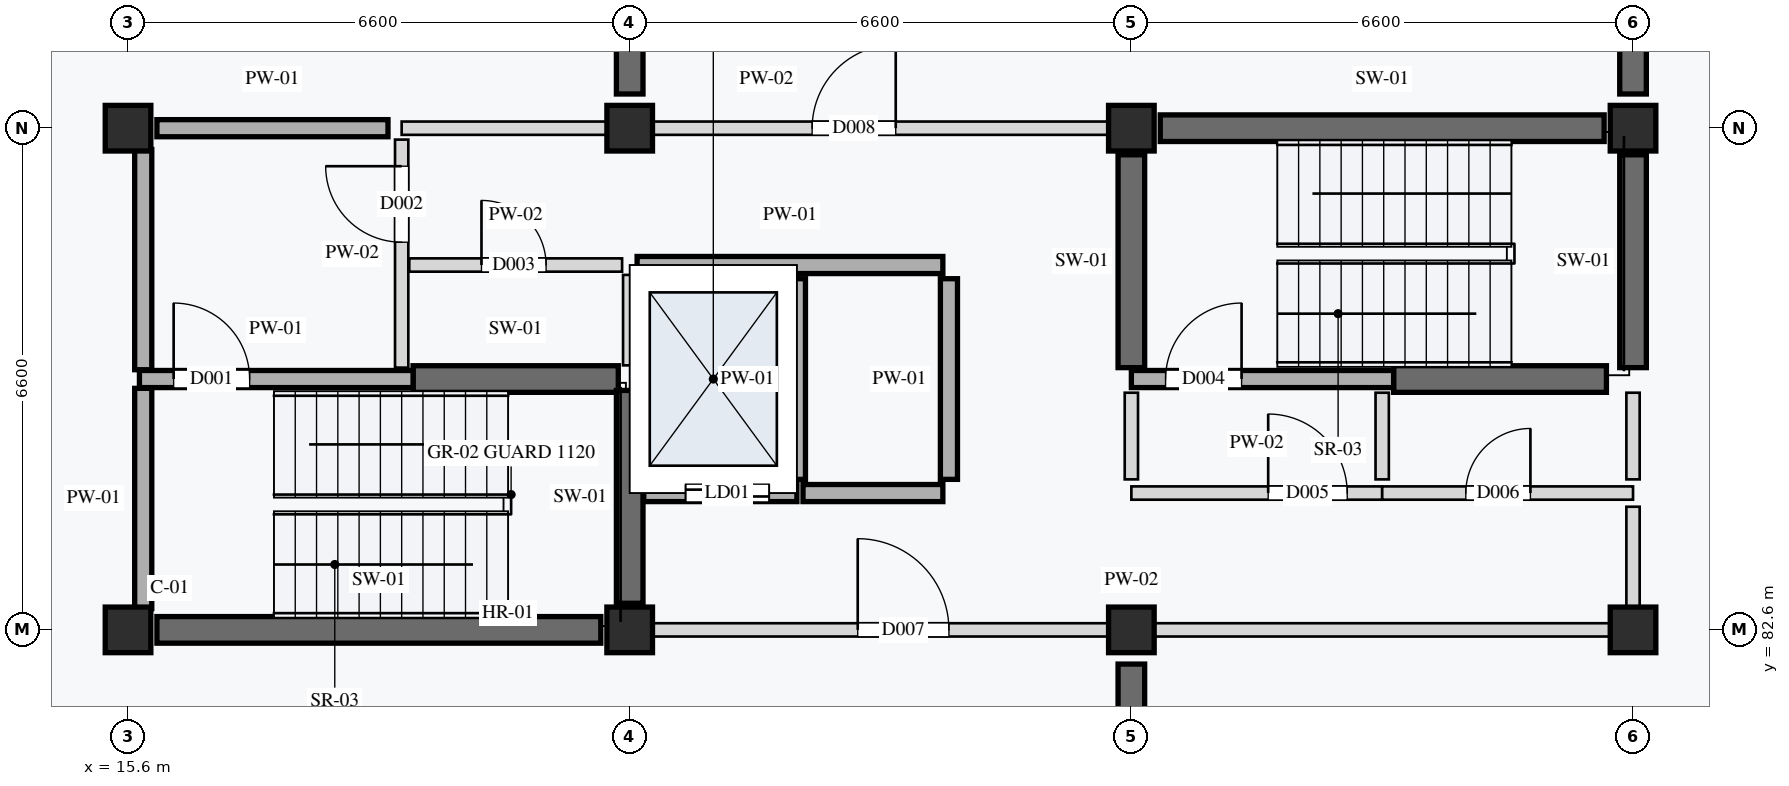
"""IFC4 building model, lengths in metres.
Left out: names, types, materials, properties, quantities, classifications, styles, units other than length and angle.
Written with IfcOpenShell. Run it as: python <this file> out.ifc"""

import sys

from ifc_helpers import new_model, si_unit, direction, frame, frame_2d, origin, origin_2d, place, context, subcontext, project, spatial, rectangle, extrude, element, fill, save


model = new_model("IFC4")
c1 = context("Model", 3, precision=1e-05, world=origin(), true_north=direction((0.0, 1.0)))
c2 = subcontext(c1, "Body", "Model", "MODEL_VIEW")
j1 = project(units=[si_unit("LENGTHUNIT", "METRE"), si_unit("PLANEANGLEUNIT", "RADIAN")], contexts=[c1])
p1 = place(None, origin())
s1 = spatial("IfcSite", under=j1, at=p1, CompositionType="ELEMENT")
p2 = place(p1, origin())
s2 = spatial("IfcBuilding", under=s1, at=p2, CompositionType="ELEMENT")
p3 = place(p2, frame((0.0, 0.0, -3.8)))
s3 = spatial("IfcBuildingStorey", under=s2, at=p3, CompositionType="ELEMENT", Elevation=-3.8)
for number, where, z_axis, x_axis in (
    (1, (15.6, 82.6, 0.0), (0.0, 0.0, 1.0), (1.0, 0.0, 0.0)),
    (2, (15.6, 89.2, 0.0), (0.0, 0.0, 1.0), (1.0, 0.0, 0.0)),
    (3, (22.2, 82.6, 0.0), (0.0, 0.0, 1.0), (1.0, 0.0, 0.0)),
    (4, (22.2, 89.2, 0.0), (0.0, 0.0, 1.0), (1.0, 0.0, 0.0)),
    (5, (28.8, 82.6, 0.0), (0.0, 0.0, 1.0), (1.0, 0.0, 0.0)),
    (6, (28.8, 89.2, 0.0), (0.0, 0.0, 1.0), (1.0, 0.0, 0.0)),
    (7, (35.4, 82.6, 0.0), (0.0, 0.0, 1.0), (1.0, 0.0, 0.0)),
    (8, (35.4, 89.2, 0.0), (0.0, 0.0, 1.0), (1.0, 0.0, 0.0)),
):
    element("IfcColumn", number, at=place(p3, frame(where, z_axis=z_axis, x_axis=x_axis)), inside=s3, PredefinedType="COLUMN", context=c2, shape_type="SweptSolid", body=[
        extrude(rectangle(XDim=0.6, YDim=0.6, at=origin_2d()), origin(), (0.0, 0.0, 1.0), 3.8),
    ])
p4 = place(p3, frame((15.98, 82.6, 0.0), z_axis=(0.0, 0.0, 1.0), x_axis=(1.0, 0.0, 0.0)))
e9 = element("IfcWall", 9, at=p4, inside=s3, PredefinedType="SHEAR", context=c2, shape_type="SweptSolid", body=[
    extrude(rectangle(XDim=5.84, YDim=0.35, at=frame_2d((2.92, 0.0))), origin(), (0.0, 0.0, 1.0), 3.52),
])
p5 = place(p3, frame((19.35, 85.9, 0.0), z_axis=(0.0, 0.0, 1.0), x_axis=(1.0, 0.0, 0.0)))
e10 = element("IfcWall", 10, at=p5, inside=s3, PredefinedType="SHEAR", context=c2, shape_type="SweptSolid", body=[
    extrude(rectangle(XDim=2.7, YDim=0.35, at=frame_2d((1.35, 0.0))), origin(), (0.0, 0.0, 1.0), 3.52),
])
p6 = place(p3, frame((22.2, 82.95, 0.0), z_axis=(0.0, 0.0, 1.0), x_axis=(0.0, 1.0, 0.0)))
e11 = element("IfcWall", 11, at=p6, inside=s3, PredefinedType="SHEAR", context=c2, shape_type="SweptSolid", body=[
    extrude(rectangle(XDim=2.8, YDim=0.35, at=frame_2d((1.4, 0.0))), origin(), (0.0, 0.0, 1.0), 3.52),
])
p7 = place(p3, frame((29.18, 89.2, 0.0), z_axis=(0.0, 0.0, 1.0), x_axis=(1.0, 0.0, 0.0)))
e12 = element("IfcWall", 12, at=p7, inside=s3, PredefinedType="SHEAR", context=c2, shape_type="SweptSolid", body=[
    extrude(rectangle(XDim=5.84, YDim=0.35, at=frame_2d((2.92, 0.0))), origin(), (0.0, 0.0, 1.0), 3.52),
])
for number, where, z_axis, x_axis in (
    (13, (32.25, 85.9, 0.0), (0.0, 0.0, 1.0), (1.0, 0.0, 0.0)),
    (14, (28.8, 86.05, 0.0), (0.0, 0.0, 1.0), (0.0, 1.0, 0.0)),
    (15, (35.4, 86.05, 0.0), (0.0, 0.0, 1.0), (0.0, 1.0, 0.0)),
):
    element("IfcWall", number, at=place(p3, frame(where, z_axis=z_axis, x_axis=x_axis)), inside=s3, PredefinedType="SHEAR", context=c2, shape_type="SweptSolid", body=[
        extrude(rectangle(XDim=2.8, YDim=0.35, at=frame_2d((1.4, 0.0))), origin(), (0.0, 0.0, 1.0), 3.52),
    ])
p8 = place(p3, frame((28.8, 76.45, 0.0), z_axis=(0.0, 0.0, 1.0), x_axis=(0.0, 1.0, 0.0)))
e16 = element("IfcWall", 16, at=p8, inside=s3, PredefinedType="SHEAR", context=c2, shape_type="SweptSolid", body=[
    extrude(rectangle(XDim=5.7, YDim=0.35, at=frame_2d((2.85, 0.0))), origin(), (0.0, 0.0, 1.0), 3.52),
])
for number, where, z_axis, x_axis in (
    (17, (22.2, 89.65, 0.0), (0.0, 0.0, 1.0), (0.0, 1.0, 0.0)),
    (18, (35.4, 89.65, 0.0), (0.0, 0.0, 1.0), (0.0, 1.0, 0.0)),
):
    element("IfcWall", number, at=place(p3, frame(where, z_axis=z_axis, x_axis=x_axis)), inside=s3, PredefinedType="SHEAR", context=c2, shape_type="SweptSolid", body=[
        extrude(rectangle(XDim=5.7, YDim=0.35, at=frame_2d((2.85, 0.0))), origin(), (0.0, 0.0, 1.0), 3.52),
    ])
p9 = place(p3, frame((15.75, 85.9, 0.0), z_axis=(0.0, 0.0, 1.0), x_axis=(1.0, 0.0, 0.0)))
e19 = element("IfcWall", 19, at=p9, inside=s3, PredefinedType="STANDARD", context=c2, shape_type="SweptSolid", body=[
    extrude(rectangle(XDim=3.6, YDim=0.225, at=frame_2d((1.8, 0.0))), origin(), (0.0, 0.0, 1.0), 3.52),
])
p10 = place(p9, frame((0.45, 0.0, 0.0)))
e20 = element("IfcOpeningElement", 20, at=p10, cuts=e19, PredefinedType="OPENING", context=c2, shape_type="SweptSolid", body=[
    extrude(rectangle(XDim=1.0, YDim=2.1, at=frame_2d((0.5, 1.05))), frame((0.0, 0.123, 0.0), z_axis=(0.0, -1.0, 0.0), x_axis=(1.0, 0.0, 0.0)), (0.0, 0.0, 1.0), 0.245),
])
p11 = place(p3, frame((19.2, 86.05, 0.0), z_axis=(0.0, 0.0, 1.0), x_axis=(0.0, 1.0, 0.0)))
e21 = element("IfcWall", 21, at=p11, inside=s3, PredefinedType="PARTITIONING", context=c2, shape_type="SweptSolid", body=[
    extrude(rectangle(XDim=3.0, YDim=0.175, at=frame_2d((1.5, 0.0))), origin(), (0.0, 0.0, 1.0), 3.52),
])
p12 = place(p11, frame((1.65, 0.0, 0.0)))
e22 = element("IfcOpeningElement", 22, at=p12, cuts=e21, PredefinedType="OPENING", context=c2, shape_type="SweptSolid", body=[
    extrude(rectangle(XDim=1.0, YDim=2.16, at=frame_2d((0.5, 1.08))), frame((0.0, 0.097, 0.0), z_axis=(0.0, -1.0, 0.0), x_axis=(1.0, 0.0, 0.0)), (0.0, 0.0, 1.0), 0.195),
])
p13 = place(p3, frame((19.3, 87.4, 0.0), z_axis=(0.0, 0.0, 1.0), x_axis=(1.0, 0.0, 0.0)))
e23 = element("IfcWall", 23, at=p13, inside=s3, PredefinedType="PARTITIONING", context=c2, shape_type="SweptSolid", body=[
    extrude(rectangle(XDim=2.8, YDim=0.175, at=frame_2d((1.4, 0.0))), origin(), (0.0, 0.0, 1.0), 3.52),
])
p14 = place(p13, frame((0.95, 0.0, 0.0)))
e24 = element("IfcOpeningElement", 24, at=p14, cuts=e23, PredefinedType="OPENING", context=c2, shape_type="SweptSolid", body=[
    extrude(rectangle(XDim=0.85, YDim=2.0, at=frame_2d((0.425, 1.0))), frame((0.0, 0.097, 0.0), z_axis=(0.0, -1.0, 0.0), x_axis=(1.0, 0.0, 0.0)), (0.0, 0.0, 1.0), 0.195),
])
p15 = place(p3, frame((22.2, 86.08, 0.0), z_axis=(0.0, 0.0, 1.0), x_axis=(0.0, 1.0, 0.0)))
e25 = element("IfcWall", 25, at=p15, inside=s3, PredefinedType="PARTITIONING", context=c2, shape_type="SweptSolid", body=[
    extrude(rectangle(XDim=1.19, YDim=0.175, at=frame_2d((0.595, 0.0))), origin(), (0.0, 0.0, 1.0), 3.52),
])
p16 = place(p3, frame((22.385, 84.4, 0.0), z_axis=(0.0, 0.0, 1.0), x_axis=(1.0, 0.0, 0.0)))
e26 = element("IfcWall", 26, at=p16, inside=s3, PredefinedType="STANDARD", context=c2, shape_type="SweptSolid", body=[
    extrude(rectangle(XDim=2.015, YDim=0.225, at=frame_2d((1.007, 0.0))), origin(), (0.0, 0.0, 1.0), 3.52),
])
p17 = place(p16, frame((0.55, 0.0, 0.0)))
e27 = element("IfcOpeningElement", 27, at=p17, cuts=e26, PredefinedType="OPENING", context=c2, shape_type="SweptSolid", body=[
    extrude(rectangle(XDim=1.1, YDim=2.1, at=frame_2d((0.55, 1.05))), frame((0.0, 0.123, 0.0), z_axis=(0.0, -1.0, 0.0), x_axis=(1.0, 0.0, 0.0)), (0.0, 0.0, 1.0), 0.245),
])
p18 = place(p3, frame((24.48, 84.4, 0.0), z_axis=(0.0, 0.0, 1.0), x_axis=(1.0, 0.0, 0.0)))
e28 = element("IfcWall", 28, at=p18, inside=s3, PredefinedType="STANDARD", context=c2, shape_type="SweptSolid", body=[
    extrude(rectangle(XDim=1.84, YDim=0.225, at=frame_2d((0.92, 0.0))), origin(), (0.0, 0.0, 1.0), 3.52),
])
p19 = place(p3, frame((22.298, 87.4, 0.0), z_axis=(0.0, 0.0, 1.0), x_axis=(1.0, 0.0, 0.0)))
e29 = element("IfcWall", 29, at=p19, inside=s3, PredefinedType="STANDARD", context=c2, shape_type="SweptSolid", body=[
    extrude(rectangle(XDim=4.022, YDim=0.225, at=frame_2d((2.011, 0.0))), origin(), (0.0, 0.0, 1.0), 3.52),
])
for number, where, z_axis, x_axis in (
    (30, (24.4, 84.58, 0.0), (0.0, 0.0, 1.0), (0.0, 1.0, 0.0)),
    (31, (26.4, 84.58, 0.0), (0.0, 0.0, 1.0), (0.0, 1.0, 0.0)),
):
    element("IfcWall", number, at=place(p3, frame(where, z_axis=z_axis, x_axis=x_axis)), inside=s3, PredefinedType="STANDARD", context=c2, shape_type="SweptSolid", body=[
        extrude(rectangle(XDim=2.64, YDim=0.225, at=frame_2d((1.32, 0.0))), origin(), (0.0, 0.0, 1.0), 3.52),
    ])
p20 = place(p3, frame((28.8, 85.9, 0.0), z_axis=(0.0, 0.0, 1.0), x_axis=(1.0, 0.0, 0.0)))
e32 = element("IfcWall", 32, at=p20, inside=s3, PredefinedType="STANDARD", context=c2, shape_type="SweptSolid", body=[
    extrude(rectangle(XDim=3.45, YDim=0.225, at=frame_2d((1.725, 0.0))), origin(), (0.0, 0.0, 1.0), 3.52),
])
p21 = place(p20, frame((0.45, 0.0, 0.0)))
e33 = element("IfcOpeningElement", 33, at=p21, cuts=e32, PredefinedType="OPENING", context=c2, shape_type="SweptSolid", body=[
    extrude(rectangle(XDim=1.0, YDim=2.16, at=frame_2d((0.5, 1.08))), frame((0.0, 0.123, 0.0), z_axis=(0.0, -1.0, 0.0), x_axis=(1.0, 0.0, 0.0)), (0.0, 0.0, 1.0), 0.245),
])
p22 = place(p3, frame((28.8, 84.4, 0.0), z_axis=(0.0, 0.0, 1.0), x_axis=(1.0, 0.0, 0.0)))
e34 = element("IfcWall", 34, at=p22, inside=s3, PredefinedType="PARTITIONING", context=c2, shape_type="SweptSolid", body=[
    extrude(rectangle(XDim=3.3, YDim=0.175, at=frame_2d((1.65, 0.0))), origin(), (0.0, 0.0, 1.0), 3.52),
])
p23 = place(p22, frame((1.8, 0.0, 0.0)))
e35 = element("IfcOpeningElement", 35, at=p23, cuts=e34, PredefinedType="OPENING", context=c2, shape_type="SweptSolid", body=[
    extrude(rectangle(XDim=1.04, YDim=2.12, at=frame_2d((0.52, 1.06))), frame((0.0, 0.097, 0.0), z_axis=(0.0, -1.0, 0.0), x_axis=(1.0, 0.0, 0.0)), (0.0, 0.0, 1.0), 0.195),
])
p24 = place(p3, frame((32.1, 84.4, 0.0), z_axis=(0.0, 0.0, 1.0), x_axis=(1.0, 0.0, 0.0)))
e36 = element("IfcWall", 36, at=p24, inside=s3, PredefinedType="PARTITIONING", context=c2, shape_type="SweptSolid", body=[
    extrude(rectangle(XDim=3.3, YDim=0.175, at=frame_2d((1.65, 0.0))), origin(), (0.0, 0.0, 1.0), 3.52),
])
p25 = place(p24, frame((1.1, 0.0, 0.0)))
e37 = element("IfcOpeningElement", 37, at=p25, cuts=e36, PredefinedType="OPENING", context=c2, shape_type="SweptSolid", body=[
    extrude(rectangle(XDim=0.85, YDim=2.0, at=frame_2d((0.425, 1.0))), frame((0.0, 0.097, 0.0), z_axis=(0.0, -1.0, 0.0), x_axis=(1.0, 0.0, 0.0)), (0.0, 0.0, 1.0), 0.195),
])
p26 = place(p3, frame((28.8, 84.58, 0.0), z_axis=(0.0, 0.0, 1.0), x_axis=(0.0, 1.0, 0.0)))
e38 = element("IfcWall", 38, at=p26, inside=s3, PredefinedType="PARTITIONING", context=c2, shape_type="SweptSolid", body=[
    extrude(rectangle(XDim=1.14, YDim=0.175, at=frame_2d((0.57, 0.0))), origin(), (0.0, 0.0, 1.0), 3.35),
])
for number, where, z_axis, x_axis in (
    (39, (32.1, 84.58, 0.0), (0.0, 0.0, 1.0), (0.0, 1.0, 0.0)),
    (40, (35.4, 84.58, 0.0), (0.0, 0.0, 1.0), (0.0, 1.0, 0.0)),
):
    element("IfcWall", number, at=place(p3, frame(where, z_axis=z_axis, x_axis=x_axis)), inside=s3, PredefinedType="PARTITIONING", context=c2, shape_type="SweptSolid", body=[
        extrude(rectangle(XDim=1.14, YDim=0.175, at=frame_2d((0.57, 0.0))), origin(), (0.0, 0.0, 1.0), 3.52),
    ])
p27 = place(p3, frame((22.2, 82.6, 0.0), z_axis=(0.0, 0.0, 1.0), x_axis=(1.0, 0.0, 0.0)))
e41 = element("IfcWall", 41, at=p27, inside=s3, PredefinedType="PARTITIONING", context=c2, shape_type="SweptSolid", body=[
    extrude(rectangle(XDim=13.2, YDim=0.175, at=frame_2d((6.6, 0.0))), origin(), (0.0, 0.0, 1.0), 3.15),
])
p28 = place(p27, frame((3.0, 0.0, 0.0)))
e42 = element("IfcOpeningElement", 42, at=p28, cuts=e41, PredefinedType="OPENING", context=c2, shape_type="SweptSolid", body=[
    extrude(rectangle(XDim=1.2, YDim=2.18, at=frame_2d((0.6, 1.09))), frame((0.0, 0.097, 0.0), z_axis=(0.0, -1.0, 0.0), x_axis=(1.0, 0.0, 0.0)), (0.0, 0.0, 1.0), 0.195),
])
p29 = place(p3, frame((19.2, 89.2, 0.0), z_axis=(0.0, 0.0, 1.0), x_axis=(1.0, 0.0, 0.0)))
e43 = element("IfcWall", 43, at=p29, inside=s3, PredefinedType="PARTITIONING", context=c2, shape_type="SweptSolid", body=[
    extrude(rectangle(XDim=9.6, YDim=0.175, at=frame_2d((4.8, 0.0))), origin(), (0.0, 0.0, 1.0), 3.15),
])
p30 = place(p29, frame((5.4, 0.0, 0.0)))
e44 = element("IfcOpeningElement", 44, at=p30, cuts=e43, PredefinedType="OPENING", context=c2, shape_type="SweptSolid", body=[
    extrude(rectangle(XDim=1.1, YDim=2.15, at=frame_2d((0.55, 1.075))), frame((0.0, 0.097, 0.0), z_axis=(0.0, -1.0, 0.0), x_axis=(1.0, 0.0, 0.0)), (0.0, 0.0, 1.0), 0.195),
])
p31 = place(p3, frame((35.4, 82.78, 0.0), z_axis=(0.0, 0.0, 1.0), x_axis=(0.0, 1.0, 0.0)))
e45 = element("IfcWall", 45, at=p31, inside=s3, PredefinedType="PARTITIONING", context=c2, shape_type="SweptSolid", body=[
    extrude(rectangle(XDim=1.44, YDim=0.175, at=frame_2d((0.72, 0.0))), origin(), (0.0, 0.0, 1.0), 3.52),
])
p32 = place(p3, frame((15.98, 89.2, 0.0), z_axis=(0.0, 0.0, 1.0), x_axis=(1.0, 0.0, 0.0)))
e46 = element("IfcWall", 46, at=p32, inside=s3, PredefinedType="STANDARD", context=c2, shape_type="SweptSolid", body=[
    extrude(rectangle(XDim=3.04, YDim=0.225, at=frame_2d((1.52, 0.0))), origin(), (0.0, 0.0, 1.0), 3.15),
])
p33 = place(p3, frame((15.8, 82.88, 0.0), z_axis=(0.0, 0.0, 1.0), x_axis=(0.0, 1.0, 0.0)))
e47 = element("IfcWall", 47, at=p33, inside=s3, PredefinedType="STANDARD", context=c2, shape_type="SweptSolid", body=[
    extrude(rectangle(XDim=2.898, YDim=0.225, at=frame_2d((1.449, 0.0))), origin(), (0.0, 0.0, 1.0), 3.52),
])
p34 = place(p3, frame((15.8, 86.022, 0.0), z_axis=(0.0, 0.0, 1.0), x_axis=(0.0, 1.0, 0.0)))
e48 = element("IfcWall", 48, at=p34, inside=s3, PredefinedType="STANDARD", context=c2, shape_type="SweptSolid", body=[
    extrude(rectangle(XDim=2.897, YDim=0.225, at=frame_2d((1.449, 0.0))), origin(), (0.0, 0.0, 1.0), 3.52),
])
p35 = place(p10, origin())
e49 = element("IfcDoor", 49, at=p35, inside=s3, OperationType="SINGLE_SWING_LEFT", PredefinedType="DOOR", context=c2, shape_type="SweptSolid", body=[
    extrude(rectangle(XDim=1.0, YDim=2.1, at=frame_2d((0.5, 1.05))), frame((0.0, 0.025, 0.0), z_axis=(0.0, -1.0, 0.0), x_axis=(1.0, 0.0, 0.0)), (0.0, 0.0, 1.0), 0.05),
])
fill(e20, e49)
p36 = place(p12, origin())
e50 = element("IfcDoor", 50, at=p36, inside=s3, OperationType="SINGLE_SWING_RIGHT", PredefinedType="DOOR", context=c2, shape_type="SweptSolid", body=[
    extrude(rectangle(XDim=1.0, YDim=2.16, at=frame_2d((0.5, 1.08))), frame((0.0, 0.025, 0.0), z_axis=(0.0, -1.0, 0.0), x_axis=(1.0, 0.0, 0.0)), (0.0, 0.0, 1.0), 0.05),
])
fill(e22, e50)
p37 = place(p14, origin())
e51 = element("IfcDoor", 51, at=p37, inside=s3, OperationType="SINGLE_SWING_LEFT", PredefinedType="DOOR", context=c2, shape_type="SweptSolid", body=[
    extrude(rectangle(XDim=0.85, YDim=2.0, at=frame_2d((0.425, 1.0))), frame((0.0, 0.025, 0.0), z_axis=(0.0, -1.0, 0.0), x_axis=(1.0, 0.0, 0.0)), (0.0, 0.0, 1.0), 0.05),
])
fill(e24, e51)
p38 = place(p17, origin())
e52 = element("IfcDoor", 52, at=p38, inside=s3, OperationType="DOUBLE_DOOR_SLIDING", PredefinedType="DOOR", context=c2, shape_type="SweptSolid", body=[
    extrude(rectangle(XDim=1.1, YDim=2.1, at=frame_2d((0.55, 1.05))), frame((0.0, 0.025, 0.0), z_axis=(0.0, -1.0, 0.0), x_axis=(1.0, 0.0, 0.0)), (0.0, 0.0, 1.0), 0.05),
])
fill(e27, e52)
p39 = place(p21, origin())
e53 = element("IfcDoor", 53, at=p39, inside=s3, OperationType="SINGLE_SWING_RIGHT", PredefinedType="DOOR", context=c2, shape_type="SweptSolid", body=[
    extrude(rectangle(XDim=1.0, YDim=2.16, at=frame_2d((0.5, 1.08))), frame((0.0, 0.025, 0.0), z_axis=(0.0, -1.0, 0.0), x_axis=(1.0, 0.0, 0.0)), (0.0, 0.0, 1.0), 0.05),
])
fill(e33, e53)
p40 = place(p23, origin())
e54 = element("IfcDoor", 54, at=p40, inside=s3, OperationType="SINGLE_SWING_LEFT", PredefinedType="DOOR", context=c2, shape_type="SweptSolid", body=[
    extrude(rectangle(XDim=1.04, YDim=2.12, at=frame_2d((0.52, 1.06))), frame((0.0, 0.025, 0.0), z_axis=(0.0, -1.0, 0.0), x_axis=(1.0, 0.0, 0.0)), (0.0, 0.0, 1.0), 0.05),
])
fill(e35, e54)
p41 = place(p25, origin())
e55 = element("IfcDoor", 55, at=p41, inside=s3, OperationType="SINGLE_SWING_RIGHT", PredefinedType="DOOR", context=c2, shape_type="SweptSolid", body=[
    extrude(rectangle(XDim=0.85, YDim=2.0, at=frame_2d((0.425, 1.0))), frame((0.0, 0.025, 0.0), z_axis=(0.0, -1.0, 0.0), x_axis=(1.0, 0.0, 0.0)), (0.0, 0.0, 1.0), 0.05),
])
fill(e37, e55)
p42 = place(p28, origin())
e56 = element("IfcDoor", 56, at=p42, inside=s3, OperationType="SINGLE_SWING_LEFT", PredefinedType="DOOR", context=c2, shape_type="SweptSolid", body=[
    extrude(rectangle(XDim=1.2, YDim=2.18, at=frame_2d((0.6, 1.09))), frame((0.0, 0.025, 0.0), z_axis=(0.0, -1.0, 0.0), x_axis=(1.0, 0.0, 0.0)), (0.0, 0.0, 1.0), 0.05),
])
fill(e42, e56)
p43 = place(p30, origin())
e57 = element("IfcDoor", 57, at=p43, inside=s3, OperationType="SINGLE_SWING_RIGHT", PredefinedType="DOOR", context=c2, shape_type="SweptSolid", body=[
    extrude(rectangle(XDim=1.1, YDim=2.15, at=frame_2d((0.55, 1.075))), frame((0.0, 0.025, 0.0), z_axis=(0.0, -1.0, 0.0), x_axis=(1.0, 0.0, 0.0)), (0.0, 0.0, 1.0), 0.05),
])
fill(e44, e57)
save(model, sys.argv[1])
